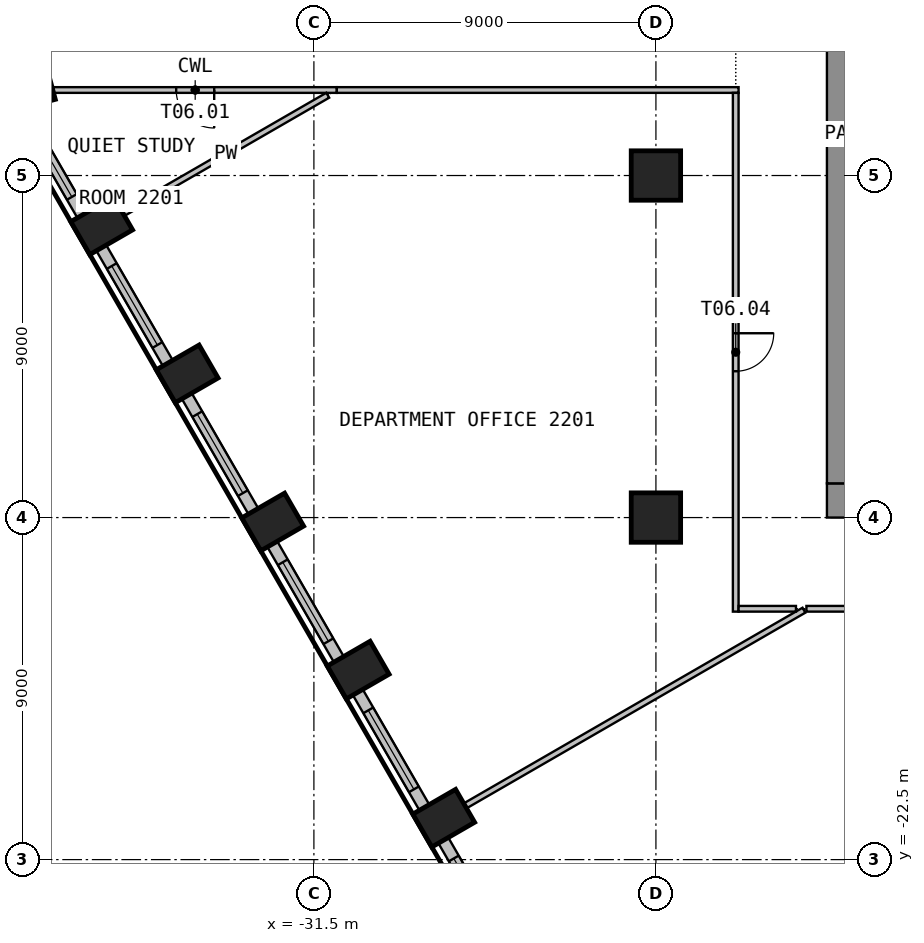
"""IFC4 building model, lengths in metres.
Left out: names, types, materials, properties, quantities, classifications, styles, units other than length and angle.
Written with IfcOpenShell. Run it as: python <this file> out.ifc"""

import sys

from ifc_helpers import new_model, si_unit, direction, frame, frame_2d, origin, origin_2d, place, context, subcontext, project, spatial, rectangle, circle, extrude, element, fill, save


model = new_model("IFC4")
c1 = context("Model", 3, precision=1e-05, world=origin(), true_north=direction((0.0, 1.0)))
c2 = subcontext(c1, "Body", "Model", "MODEL_VIEW")
j1 = project(units=[si_unit("LENGTHUNIT", "METRE"), si_unit("PLANEANGLEUNIT", "RADIAN")], contexts=[c1])
p1 = place(None, origin())
s1 = spatial("IfcSite", under=j1, at=p1, CompositionType="ELEMENT")
p2 = place(p1, origin())
s2 = spatial("IfcBuilding", under=s1, at=p2, CompositionType="ELEMENT")
p3 = place(p2, frame((0.0, 0.0, 93.0)))
s3 = spatial("IfcBuildingStorey", under=s2, at=p3, CompositionType="ELEMENT", Elevation=93.0)
p4 = place(p3, frame((-39.101, -2.037, 0.0), z_axis=(0.0, 0.0, 1.0), x_axis=(0.258819045103, -0.965925826289, 0.0)))
e1 = element("IfcColumn", 1, at=p4, inside=s3, PredefinedType="COLUMN", context=c2, shape_type="SweptSolid", body=[
    extrude(rectangle(XDim=1.3, YDim=1.3, at=origin_2d()), origin(), (0.0, 0.0, 1.0), 3.525),
])
for number, where, z_axis, x_axis in (
    (2, (-37.084, -5.822, 0.0), (0.0, 0.0, 1.0), (0.5, -0.866, 0.0)),
    (3, (-34.834, -9.719, 0.0), (0.0, 0.0, 1.0), (0.5, -0.866, 0.0)),
    (4, (-32.584, -13.616, 0.0), (0.0, 0.0, 1.0), (0.5, -0.866, 0.0)),
    (5, (-30.334, -17.513, 0.0), (0.0, 0.0, 1.0), (0.5, -0.866, 0.0)),
    (6, (-28.084, -21.411, 0.0), (0.0, 0.0, 1.0), (0.5, -0.866, 0.0)),
):
    element("IfcColumn", number, at=place(p3, frame(where, z_axis=z_axis, x_axis=x_axis)), inside=s3, PredefinedType="COLUMN", context=c2, shape_type="SweptSolid", body=[
        extrude(rectangle(XDim=1.0, YDim=1.3, at=origin_2d()), origin(), (0.0, 0.0, 1.0), 3.525),
    ])
for number, where, z_axis, x_axis in (
    (7, (-22.5, -13.5, 0.0), (0.0, 0.0, 1.0), (1.0, 0.0, 0.0)),
    (8, (-22.5, -4.5, 0.0), (0.0, 0.0, 1.0), (1.0, 0.0, 0.0)),
):
    element("IfcColumn", number, at=place(p3, frame(where, z_axis=z_axis, x_axis=x_axis)), inside=s3, PredefinedType="COLUMN", context=c2, shape_type="SweptSolid", body=[
        extrude(circle(Radius=0.65, at=origin_2d()), origin(), (0.0, 0.0, 1.0), 3.525),
    ])
p5 = place(p3, frame((-39.19, -2.774, 0.0), z_axis=(0.0, 0.0, 1.0), x_axis=(0.500004907028, -0.866022570692, 0.0)))
e9 = element("IfcWall", 9, at=p5, inside=s3, PredefinedType="SOLIDWALL", context=c2, shape_type="SweptSolid", body=[
    extrude(rectangle(XDim=3.192, YDim=0.3, at=frame_2d((1.596, 0.0))), origin(), (0.0, 0.0, 1.0), 3.525),
])
p6 = place(p5, frame((0.243, 0.0, 0.9)))
e10 = element("IfcOpeningElement", 10, at=p6, cuts=e9, PredefinedType="OPENING", context=c2, shape_type="SweptSolid", body=[
    extrude(rectangle(XDim=2.4, YDim=2.1, at=frame_2d((1.2, 1.05))), frame((0.0, 0.16, 0.0), z_axis=(0.0, -1.0, 0.0), x_axis=(1.0, 0.0, 0.0)), (0.0, 0.0, 1.0), 0.32),
])
p7 = place(p3, frame((-37.094, -6.406, 0.0), z_axis=(0.0, 0.0, 1.0), x_axis=(0.499996256241, -0.866027565234, 0.0)))
e11 = element("IfcWall", 11, at=p7, inside=s3, PredefinedType="SOLIDWALL", context=c2, shape_type="SweptSolid", body=[
    extrude(rectangle(XDim=3.499, YDim=0.3, at=frame_2d((1.75, 0.0))), origin(), (0.0, 0.0, 1.0), 3.525),
])
p8 = place(p7, frame((0.55, 0.0, 0.9)))
e12 = element("IfcOpeningElement", 12, at=p8, cuts=e11, PredefinedType="OPENING", context=c2, shape_type="SweptSolid", body=[
    extrude(rectangle(XDim=2.4, YDim=2.1, at=frame_2d((1.2, 1.05))), frame((0.0, 0.16, 0.0), z_axis=(0.0, -1.0, 0.0), x_axis=(1.0, 0.0, 0.0)), (0.0, 0.0, 1.0), 0.32),
])
p9 = place(p3, frame((-34.844, -10.303, 0.0), z_axis=(0.0, 0.0, 1.0), x_axis=(0.499996256241, -0.866027565234, 0.0)))
e13 = element("IfcWall", 13, at=p9, inside=s3, PredefinedType="SOLIDWALL", context=c2, shape_type="SweptSolid", body=[
    extrude(rectangle(XDim=3.499, YDim=0.3, at=frame_2d((1.75, 0.0))), origin(), (0.0, 0.0, 1.0), 3.525),
])
p10 = place(p9, frame((0.55, 0.0, 0.9)))
e14 = element("IfcOpeningElement", 14, at=p10, cuts=e13, PredefinedType="OPENING", context=c2, shape_type="SweptSolid", body=[
    extrude(rectangle(XDim=2.4, YDim=2.1, at=frame_2d((1.2, 1.05))), frame((0.0, 0.16, 0.0), z_axis=(0.0, -1.0, 0.0), x_axis=(1.0, 0.0, 0.0)), (0.0, 0.0, 1.0), 0.32),
])
p11 = place(p3, frame((-32.594, -14.2, 0.0), z_axis=(0.0, 0.0, 1.0), x_axis=(0.499996256241, -0.866027565234, 0.0)))
e15 = element("IfcWall", 15, at=p11, inside=s3, PredefinedType="SOLIDWALL", context=c2, shape_type="SweptSolid", body=[
    extrude(rectangle(XDim=3.499, YDim=0.3, at=frame_2d((1.75, 0.0))), origin(), (0.0, 0.0, 1.0), 3.525),
])
p12 = place(p11, frame((0.55, 0.0, 0.9)))
e16 = element("IfcOpeningElement", 16, at=p12, cuts=e15, PredefinedType="OPENING", context=c2, shape_type="SweptSolid", body=[
    extrude(rectangle(XDim=2.4, YDim=2.1, at=frame_2d((1.2, 1.05))), frame((0.0, 0.16, 0.0), z_axis=(0.0, -1.0, 0.0), x_axis=(1.0, 0.0, 0.0)), (0.0, 0.0, 1.0), 0.32),
])
p13 = place(p3, frame((-30.344, -18.097, 0.0), z_axis=(0.0, 0.0, 1.0), x_axis=(0.499996256241, -0.866027565234, 0.0)))
e17 = element("IfcWall", 17, at=p13, inside=s3, PredefinedType="SOLIDWALL", context=c2, shape_type="SweptSolid", body=[
    extrude(rectangle(XDim=3.499, YDim=0.3, at=frame_2d((1.75, 0.0))), origin(), (0.0, 0.0, 1.0), 3.525),
])
p14 = place(p13, frame((0.55, 0.0, 0.9)))
e18 = element("IfcOpeningElement", 18, at=p14, cuts=e17, PredefinedType="OPENING", context=c2, shape_type="SweptSolid", body=[
    extrude(rectangle(XDim=2.4, YDim=2.1, at=frame_2d((1.2, 1.05))), frame((0.0, 0.16, 0.0), z_axis=(0.0, -1.0, 0.0), x_axis=(1.0, 0.0, 0.0)), (0.0, 0.0, 1.0), 0.32),
])
p15 = place(p3, frame((-28.094, -21.994, 0.0), z_axis=(0.0, 0.0, 1.0), x_axis=(0.499996256241, -0.866027565234, 0.0)))
e19 = element("IfcWall", 19, at=p15, inside=s3, PredefinedType="SOLIDWALL", context=c2, shape_type="SweptSolid", body=[
    extrude(rectangle(XDim=3.499, YDim=0.3, at=frame_2d((1.75, 0.0))), origin(), (0.0, 0.0, 1.0), 3.525),
])
p16 = place(p15, frame((0.55, 0.0, 0.9)))
e20 = element("IfcOpeningElement", 20, at=p16, cuts=e19, PredefinedType="OPENING", context=c2, shape_type="SweptSolid", body=[
    extrude(rectangle(XDim=2.4, YDim=2.1, at=frame_2d((1.2, 1.05))), frame((0.0, 0.16, 0.0), z_axis=(0.0, -1.0, 0.0), x_axis=(1.0, 0.0, 0.0)), (0.0, 0.0, 1.0), 0.32),
])
p17 = place(p3, frame((-18.0, -13.05, 0.0), z_axis=(0.0, 0.0, 1.0), x_axis=(1.0, 0.0, 0.0)))
e21 = element("IfcWall", 21, at=p17, inside=s3, PredefinedType="SHEAR", context=c2, shape_type="SweptSolid", body=[
    extrude(rectangle(XDim=36.0, YDim=0.9, at=frame_2d((18.0, 0.0))), origin(), (0.0, 0.0, 1.0), 3.525),
])
p18 = place(p17, frame((16.8, 0.0, 0.0)))
e22 = element("IfcOpeningElement", 22, at=p18, cuts=e21, PredefinedType="OPENING", context=c2, shape_type="SweptSolid", body=[
    extrude(rectangle(XDim=2.4, YDim=2.1, at=frame_2d((1.2, 1.05))), frame((0.0, 0.46, 0.0), z_axis=(0.0, -1.0, 0.0), x_axis=(1.0, 0.0, 0.0)), (0.0, 0.0, 1.0), 0.92),
])
p19 = place(p17, frame((5.55, 0.0, 0.0)))
e23 = element("IfcOpeningElement", 23, at=p19, cuts=e21, PredefinedType="OPENING", context=c2, shape_type="SweptSolid", body=[
    extrude(rectangle(XDim=1.2, YDim=2.1, at=frame_2d((0.6, 1.05))), frame((0.0, 0.46, 0.0), z_axis=(0.0, -1.0, 0.0), x_axis=(1.0, 0.0, 0.0)), (0.0, 0.0, 1.0), 0.92),
])
p20 = place(p17, frame((29.25, 0.0, 0.0)))
e24 = element("IfcOpeningElement", 24, at=p20, cuts=e21, PredefinedType="OPENING", context=c2, shape_type="SweptSolid", body=[
    extrude(rectangle(XDim=1.2, YDim=2.1, at=frame_2d((0.6, 1.05))), frame((0.0, 0.46, 0.0), z_axis=(0.0, -1.0, 0.0), x_axis=(1.0, 0.0, 0.0)), (0.0, 0.0, 1.0), 0.92),
])
p21 = place(p3, frame((-17.55, -12.6, 0.0), z_axis=(0.0, 0.0, 1.0), x_axis=(0.0, 1.0, 0.0)))
e25 = element("IfcWall", 25, at=p21, inside=s3, PredefinedType="SHEAR", context=c2, shape_type="SweptSolid", body=[
    extrude(rectangle(XDim=25.2, YDim=0.9, at=frame_2d((12.6, 0.0))), origin(), (0.0, 0.0, 1.0), 3.525),
])
p22 = place(p21, frame((11.4, 0.0, 0.0)))
e26 = element("IfcOpeningElement", 26, at=p22, cuts=e25, PredefinedType="OPENING", context=c2, shape_type="SweptSolid", body=[
    extrude(rectangle(XDim=2.4, YDim=2.1, at=frame_2d((1.2, 1.05))), frame((0.0, 0.46, 0.0), z_axis=(0.0, -1.0, 0.0), x_axis=(1.0, 0.0, 0.0)), (0.0, 0.0, 1.0), 0.92),
])
p23 = place(p3, frame((-30.897, -2.25, 0.0), z_axis=(0.0, 0.0, 1.0), x_axis=(-1.0, 0.0, 0.0)))
e27 = element("IfcWall", 27, at=p23, inside=s3, PredefinedType="PARTITIONING", context=c2, shape_type="SweptSolid", body=[
    extrude(rectangle(XDim=7.453, YDim=0.15, at=frame_2d((3.727, 0.0))), origin(), (0.0, 0.0, 1.0), 3.525),
])
p24 = place(p23, frame((3.227, 0.0, 0.0)))
e28 = element("IfcOpeningElement", 28, at=p24, cuts=e27, PredefinedType="OPENING", context=c2, shape_type="SweptSolid", body=[
    extrude(rectangle(XDim=1.0, YDim=2.1, at=frame_2d((0.5, 1.05))), frame((0.0, 0.085, 0.0), z_axis=(0.0, -1.0, 0.0), x_axis=(1.0, 0.0, 0.0)), (0.0, 0.0, 1.0), 0.17),
])
p25 = place(p3, frame((-31.135, -2.387, 0.0), z_axis=(0.0, 0.0, 1.0), x_axis=(-0.866007197923, -0.500031532152, 0.0)))
e29 = element("IfcWall", 29, at=p25, inside=s3, PredefinedType="PARTITIONING", context=c2, shape_type="SweptSolid", body=[
    extrude(rectangle(XDim=6.199, YDim=0.15, at=frame_2d((3.1, 0.0))), origin(), (0.0, 0.0, 1.0), 3.525),
])
p26 = place(p3, frame((-20.325, -2.25, 0.0), z_axis=(0.0, 0.0, 1.0), x_axis=(-1.0, 0.0, 0.0)))
e30 = element("IfcWall", 30, at=p26, inside=s3, PredefinedType="PARTITIONING", context=c2, shape_type="SweptSolid", body=[
    extrude(rectangle(XDim=10.572, YDim=0.15, at=frame_2d((5.286, 0.0))), origin(), (0.0, 0.0, 1.0), 3.525),
])
p27 = place(p3, frame((-18.605, -15.938, 0.0), z_axis=(0.0, 0.0, 1.0), x_axis=(-0.8659928916, -0.500056308527, 0.0)))
e31 = element("IfcWall", 31, at=p27, inside=s3, PredefinedType="PARTITIONING", context=c2, shape_type="SweptSolid", body=[
    extrude(rectangle(XDim=10.276, YDim=0.15, at=frame_2d((5.138, 0.0))), origin(), (0.0, 0.0, 1.0), 3.525),
])
p28 = place(p3, frame((-20.4, -2.325, 0.0), z_axis=(0.0, 0.0, 1.0), x_axis=(0.0, -1.0, 0.0)))
e32 = element("IfcWall", 32, at=p28, inside=s3, PredefinedType="PARTITIONING", context=c2, shape_type="SweptSolid", body=[
    extrude(rectangle(XDim=13.65, YDim=0.15, at=frame_2d((6.825, 0.0))), origin(), (0.0, 0.0, 1.0), 3.525),
])
p29 = place(p28, frame((6.325, 0.0, 0.0)))
e33 = element("IfcOpeningElement", 33, at=p29, cuts=e32, PredefinedType="OPENING", context=c2, shape_type="SweptSolid", body=[
    extrude(rectangle(XDim=1.0, YDim=2.1, at=frame_2d((0.5, 1.05))), frame((0.0, 0.085, 0.0), z_axis=(0.0, -1.0, 0.0), x_axis=(1.0, 0.0, 0.0)), (0.0, 0.0, 1.0), 0.17),
])
p30 = place(p3, frame((-20.325, -15.9, 0.0), z_axis=(0.0, 0.0, 1.0), x_axis=(1.0, 0.0, 0.0)))
e34 = element("IfcWall", 34, at=p30, inside=s3, PredefinedType="PARTITIONING", context=c2, shape_type="SweptSolid", body=[
    extrude(rectangle(XDim=1.51, YDim=0.15, at=frame_2d((0.755, 0.0))), origin(), (0.0, 0.0, 1.0), 3.525),
])
p31 = place(p3, frame((-18.54, -15.9, 0.0), z_axis=(0.0, 0.0, 1.0), x_axis=(1.0, 0.0, 0.0)))
e35 = element("IfcWall", 35, at=p31, inside=s3, PredefinedType="PARTITIONING", context=c2, shape_type="SweptSolid", body=[
    extrude(rectangle(XDim=7.29, YDim=0.15, at=frame_2d((3.645, 0.0))), origin(), (0.0, 0.0, 1.0), 3.525),
])
p32 = place(p6, origin())
e36 = element("IfcWindow", 36, at=p32, inside=s3, PartitioningType="SINGLE_PANEL", PredefinedType="WINDOW", context=c2, shape_type="SweptSolid", body=[
    extrude(rectangle(XDim=2.4, YDim=2.1, at=frame_2d((1.2, 1.05))), frame((0.0, 0.03, 0.0), z_axis=(0.0, -1.0, 0.0), x_axis=(1.0, 0.0, 0.0)), (0.0, 0.0, 1.0), 0.06),
])
fill(e10, e36)
p33 = place(p8, origin())
e37 = element("IfcWindow", 37, at=p33, inside=s3, PartitioningType="SINGLE_PANEL", PredefinedType="WINDOW", context=c2, shape_type="SweptSolid", body=[
    extrude(rectangle(XDim=2.4, YDim=2.1, at=frame_2d((1.2, 1.05))), frame((0.0, 0.03, 0.0), z_axis=(0.0, -1.0, 0.0), x_axis=(1.0, 0.0, 0.0)), (0.0, 0.0, 1.0), 0.06),
])
fill(e12, e37)
p34 = place(p10, origin())
e38 = element("IfcWindow", 38, at=p34, inside=s3, PartitioningType="SINGLE_PANEL", PredefinedType="WINDOW", context=c2, shape_type="SweptSolid", body=[
    extrude(rectangle(XDim=2.4, YDim=2.1, at=frame_2d((1.2, 1.05))), frame((0.0, 0.03, 0.0), z_axis=(0.0, -1.0, 0.0), x_axis=(1.0, 0.0, 0.0)), (0.0, 0.0, 1.0), 0.06),
])
fill(e14, e38)
p35 = place(p12, origin())
e39 = element("IfcWindow", 39, at=p35, inside=s3, PartitioningType="SINGLE_PANEL", PredefinedType="WINDOW", context=c2, shape_type="SweptSolid", body=[
    extrude(rectangle(XDim=2.4, YDim=2.1, at=frame_2d((1.2, 1.05))), frame((0.0, 0.03, 0.0), z_axis=(0.0, -1.0, 0.0), x_axis=(1.0, 0.0, 0.0)), (0.0, 0.0, 1.0), 0.06),
])
fill(e16, e39)
p36 = place(p14, origin())
e40 = element("IfcWindow", 40, at=p36, inside=s3, PartitioningType="SINGLE_PANEL", PredefinedType="WINDOW", context=c2, shape_type="SweptSolid", body=[
    extrude(rectangle(XDim=2.4, YDim=2.1, at=frame_2d((1.2, 1.05))), frame((0.0, 0.03, 0.0), z_axis=(0.0, -1.0, 0.0), x_axis=(1.0, 0.0, 0.0)), (0.0, 0.0, 1.0), 0.06),
])
fill(e18, e40)
p37 = place(p16, origin())
e41 = element("IfcWindow", 41, at=p37, inside=s3, PartitioningType="SINGLE_PANEL", PredefinedType="WINDOW", context=c2, shape_type="SweptSolid", body=[
    extrude(rectangle(XDim=2.4, YDim=2.1, at=frame_2d((1.2, 1.05))), frame((0.0, 0.03, 0.0), z_axis=(0.0, -1.0, 0.0), x_axis=(1.0, 0.0, 0.0)), (0.0, 0.0, 1.0), 0.06),
])
fill(e20, e41)
p38 = place(p24, origin())
e42 = element("IfcDoor", 42, at=p38, inside=s3, OperationType="SINGLE_SWING_RIGHT", PredefinedType="DOOR", context=c2, shape_type="SweptSolid", body=[
    extrude(rectangle(XDim=1.0, YDim=2.1, at=frame_2d((0.5, 1.05))), frame((0.0, 0.025, 0.0), z_axis=(0.0, -1.0, 0.0), x_axis=(1.0, 0.0, 0.0)), (0.0, 0.0, 1.0), 0.05),
])
fill(e28, e42)
p39 = place(p29, origin())
e43 = element("IfcDoor", 43, at=p39, inside=s3, OperationType="SINGLE_SWING_RIGHT", PredefinedType="DOOR", context=c2, shape_type="SweptSolid", body=[
    extrude(rectangle(XDim=1.0, YDim=2.1, at=frame_2d((0.5, 1.05))), frame((0.0, 0.025, 0.0), z_axis=(0.0, -1.0, 0.0), x_axis=(1.0, 0.0, 0.0)), (0.0, 0.0, 1.0), 0.05),
])
fill(e33, e43)
save(model, sys.argv[1])
